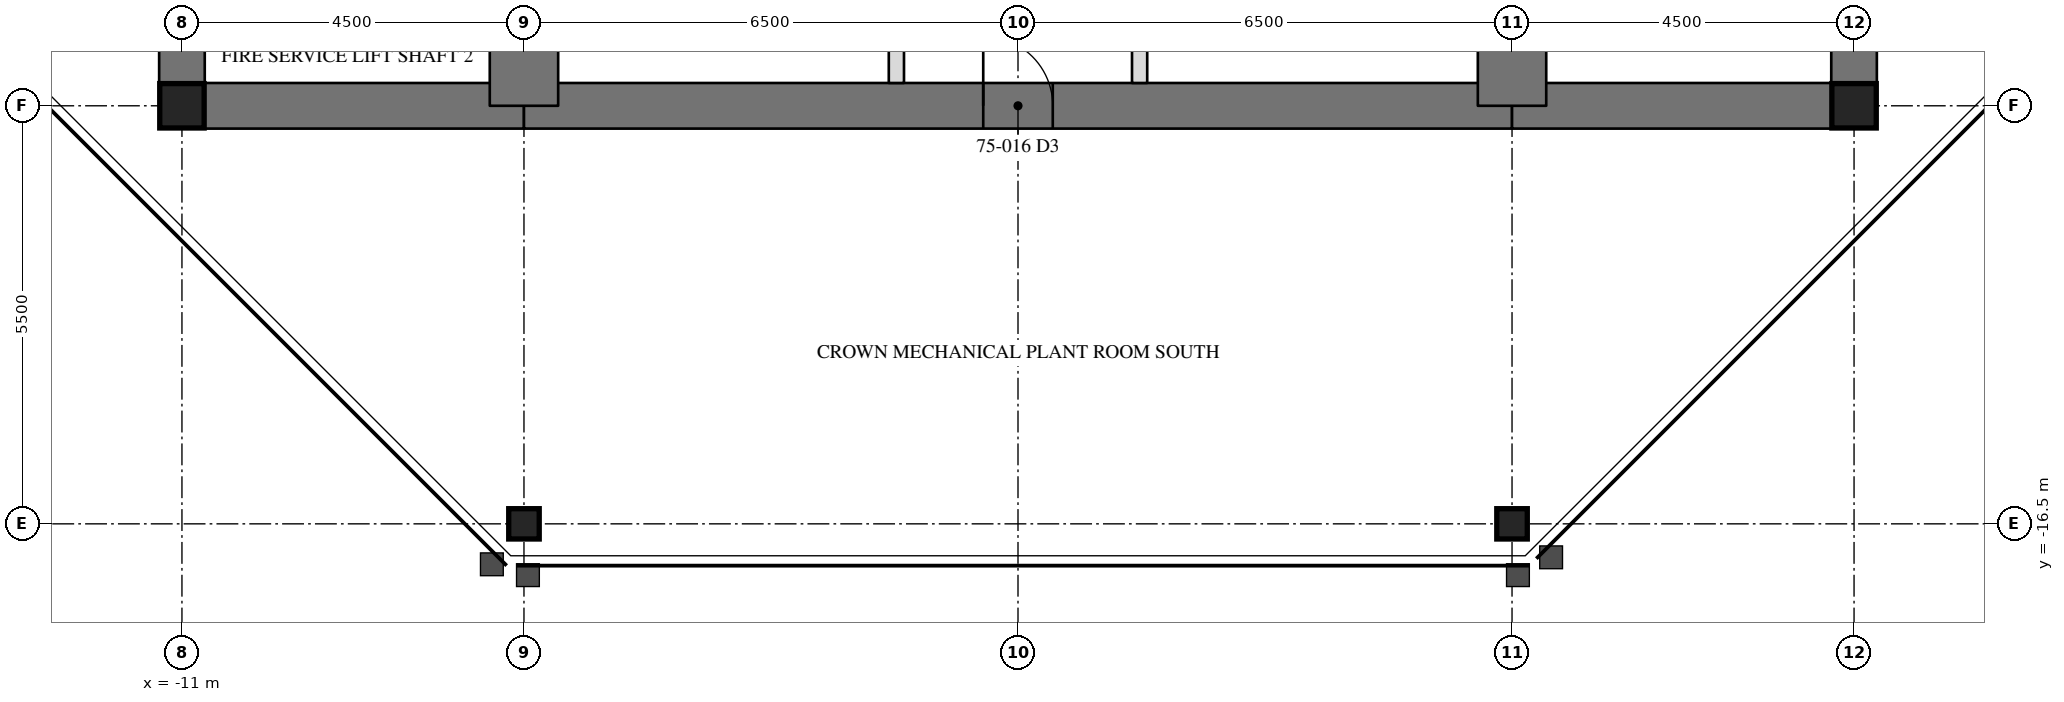
"""IFC4 building model, lengths in metres.
Left out: names, types, materials, properties, quantities, classifications, styles, units other than length and angle.
Written with IfcOpenShell. Run it as: python <this file> out.ifc"""

import sys

from ifc_helpers import new_model, si_unit, direction, frame, frame_2d, origin, origin_2d, place, context, subcontext, project, spatial, rectangle, hollow_rectangle, i_section, extrude, element, fill, save


model = new_model("IFC4")
c1 = context("Model", 3, precision=1e-05, world=origin(), true_north=direction((0.0, 1.0)))
c2 = subcontext(c1, "Body", "Model", "MODEL_VIEW")
j1 = project(units=[si_unit("LENGTHUNIT", "METRE"), si_unit("PLANEANGLEUNIT", "RADIAN")], contexts=[c1])
p1 = place(None, origin())
s1 = spatial("IfcSite", under=j1, at=p1, CompositionType="ELEMENT")
p2 = place(p1, origin())
s2 = spatial("IfcBuilding", under=s1, at=p2, CompositionType="ELEMENT")
p3 = place(p2, frame((0.0, 0.0, 304.2)))
s3 = spatial("IfcBuildingStorey", under=s2, at=p3, CompositionType="ELEMENT", Elevation=304.2)
for number, where, z_axis, x_axis in (
    (1, (-6.5, -16.5, 0.0), (0.0, 0.0, 1.0), (1.0, 0.0, 0.0)),
    (2, (6.5, -16.5, 0.0), (0.0, 0.0, 1.0), (1.0, 0.0, 0.0)),
):
    element("IfcColumn", number, at=place(p3, frame(where, z_axis=z_axis, x_axis=x_axis)), inside=s3, PredefinedType="COLUMN", context=c2, shape_type="SweptSolid", body=[
        extrude(i_section(OverallWidth=0.401, OverallDepth=0.399, WebThickness=0.025, FlangeThickness=0.04, at=origin_2d()), origin(), (0.0, 0.0, 1.0), 6.0),
    ])
p4 = place(p3, frame((11.0, -11.0, 0.0), z_axis=(0.0, 0.0, 1.0), x_axis=(0.0, 1.0, 0.0)))
e3 = element("IfcWall", 3, at=p4, inside=s3, PredefinedType="SHEAR", context=c2, shape_type="SweptSolid", body=[
    extrude(rectangle(XDim=22.0, YDim=0.6, at=frame_2d((11.0, 0.0))), origin(), (0.0, 0.0, 1.0), 6.0),
])
p5 = place(p4, frame((15.393, 0.0, 0.0)))
e4 = element("IfcOpeningElement", 4, at=p5, cuts=e3, PredefinedType="OPENING", context=c2, shape_type="SweptSolid", body=[
    extrude(rectangle(XDim=0.915, YDim=2.134, at=frame_2d((0.458, 1.067))), frame((0.0, 0.31, 0.0), z_axis=(0.0, -1.0, 0.0), x_axis=(1.0, 0.0, 0.0)), (0.0, 0.0, 1.0), 0.62),
])
p6 = place(p3, frame((-11.0, 11.0, 0.0), z_axis=(0.0, 0.0, 1.0), x_axis=(0.0, -1.0, 0.0)))
e5 = element("IfcWall", 5, at=p6, inside=s3, PredefinedType="SHEAR", context=c2, shape_type="SweptSolid", body=[
    extrude(rectangle(XDim=22.0, YDim=0.6, at=frame_2d((11.0, 0.0))), origin(), (0.0, 0.0, 1.0), 6.0),
])
p7 = place(p6, frame((15.393, 0.0, 0.0)))
e6 = element("IfcOpeningElement", 6, at=p7, cuts=e5, PredefinedType="OPENING", context=c2, shape_type="SweptSolid", body=[
    extrude(rectangle(XDim=0.915, YDim=2.134, at=frame_2d((0.458, 1.067))), frame((0.0, 0.31, 0.0), z_axis=(0.0, -1.0, 0.0), x_axis=(1.0, 0.0, 0.0)), (0.0, 0.0, 1.0), 0.62),
])
p8 = place(p3, frame((-11.0, -11.0, 0.0), z_axis=(0.0, 0.0, 1.0), x_axis=(1.0, 0.0, 0.0)))
e7 = element("IfcWall", 7, at=p8, inside=s3, PredefinedType="SHEAR", context=c2, shape_type="SweptSolid", body=[
    extrude(rectangle(XDim=4.5, YDim=0.6, at=frame_2d((2.25, 0.0))), origin(), (0.0, 0.0, 1.0), 6.0),
])
p9 = place(p3, frame((-6.5, -11.0, 0.0), z_axis=(0.0, 0.0, 1.0), x_axis=(1.0, 0.0, 0.0)))
e8 = element("IfcWall", 8, at=p9, inside=s3, PredefinedType="SHEAR", context=c2, shape_type="SweptSolid", body=[
    extrude(rectangle(XDim=13.0, YDim=0.6, at=frame_2d((6.5, 0.0))), origin(), (0.0, 0.0, 1.0), 6.0),
])
p10 = place(p9, frame((6.042, 0.0, 0.0)))
e9 = element("IfcOpeningElement", 9, at=p10, cuts=e8, PredefinedType="OPENING", context=c2, shape_type="SweptSolid", body=[
    extrude(rectangle(XDim=0.915, YDim=2.134, at=frame_2d((0.458, 1.067))), frame((0.0, 0.31, 0.0), z_axis=(0.0, -1.0, 0.0), x_axis=(1.0, 0.0, 0.0)), (0.0, 0.0, 1.0), 0.62),
])
p11 = place(p3, frame((6.5, -11.0, 0.0), z_axis=(0.0, 0.0, 1.0), x_axis=(1.0, 0.0, 0.0)))
e10 = element("IfcWall", 10, at=p11, inside=s3, PredefinedType="SHEAR", context=c2, shape_type="SweptSolid", body=[
    extrude(rectangle(XDim=4.5, YDim=0.6, at=frame_2d((2.25, 0.0))), origin(), (0.0, 0.0, 1.0), 6.0),
])
for number, where, z_axis, x_axis in (
    (11, (6.5, -11.0, 0.0), (0.0, 0.0, 1.0), (0.0, 1.0, 0.0)),
    (12, (-6.5, -6.5, 0.0), (0.0, 0.0, 1.0), (0.0, -1.0, 0.0)),
):
    element("IfcWall", number, at=place(p3, frame(where, z_axis=z_axis, x_axis=x_axis)), inside=s3, PredefinedType="SHEAR", context=c2, shape_type="SweptSolid", body=[
        extrude(rectangle(XDim=4.5, YDim=0.9, at=frame_2d((2.25, 0.0))), origin(), (0.0, 0.0, 1.0), 6.0),
    ])
for number, where, z_axis, x_axis in (
    (13, (-11.0, -11.0, 0.0), (0.0, 0.0, 1.0), (1.0, 0.0, 0.0)),
    (14, (11.0, -11.0, 0.0), (0.0, 0.0, 1.0), (1.0, 0.0, 0.0)),
):
    element("IfcColumn", number, at=place(p3, frame(where, z_axis=z_axis, x_axis=x_axis)), inside=s3, PredefinedType="COLUMN", context=c2, shape_type="SweptSolid", body=[
        extrude(hollow_rectangle(XDim=0.584, YDim=0.584, WallThickness=0.051, at=origin_2d()), origin(), (0.0, 0.0, 1.0), 6.0),
    ])
for number, where, z_axis, x_axis in (
    (15, (-1.6, -6.95, 0.0), (0.0, 0.0, 1.0), (0.0, -1.0, 0.0)),
    (16, (1.6, -6.95, 0.0), (0.0, 0.0, 1.0), (0.0, -1.0, 0.0)),
):
    element("IfcWall", number, at=place(p3, frame(where, z_axis=z_axis, x_axis=x_axis)), inside=s3, PredefinedType="PARTITIONING", context=c2, shape_type="SweptSolid", body=[
        extrude(rectangle(XDim=3.75, YDim=0.2, at=frame_2d((1.875, 0.0))), origin(), (0.0, 0.0, 1.0), 5.81),
    ])
p12 = place(p10, origin())
e17 = element("IfcDoor", 17, at=p12, inside=s3, OperationType="SINGLE_SWING_RIGHT", PredefinedType="DOOR", context=c2, shape_type="SweptSolid", body=[
    extrude(rectangle(XDim=0.915, YDim=2.134, at=frame_2d((0.458, 1.067))), frame((0.0, -0.225, 0.0), z_axis=(0.0, -1.0, 0.0), x_axis=(1.0, 0.0, 0.0)), (0.0, 0.0, 1.0), 0.05),
])
fill(e9, e17)
save(model, sys.argv[1])
